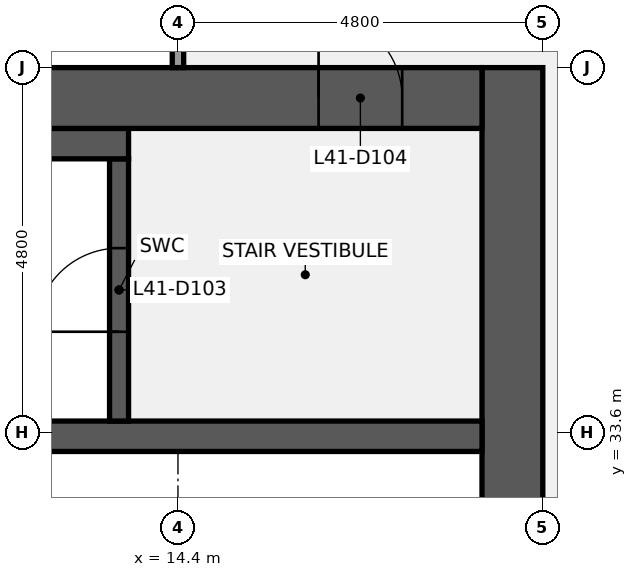
"""IFC4 building model, lengths in metres.
Left out: names, types, materials, properties, quantities, classifications, styles, units other than length and angle.
Written with IfcOpenShell. Run it as: python <this file> out.ifc"""

import sys

from ifc_helpers import new_model, si_unit, direction, frame, frame_2d, origin, place, context, subcontext, project, spatial, rectangle, extrude, element, fill, save


model = new_model("IFC4")
c1 = context("Model", 3, precision=1e-05, world=origin(), true_north=direction((0.0, 1.0)))
c2 = subcontext(c1, "Body", "Model", "MODEL_VIEW")
j1 = project(units=[si_unit("LENGTHUNIT", "METRE"), si_unit("PLANEANGLEUNIT", "RADIAN")], contexts=[c1])
p1 = place(None, origin())
s1 = spatial("IfcSite", under=j1, at=p1, CompositionType="ELEMENT")
p2 = place(p1, origin())
s2 = spatial("IfcBuilding", under=s1, at=p2, CompositionType="ELEMENT")
p3 = place(p2, frame((0.0, 0.0, 193.2)))
s3 = spatial("IfcBuildingStorey", under=s2, at=p3, CompositionType="ELEMENT", Elevation=193.2)
p4 = place(p3, frame((18.8, 38.4, 0.0), z_axis=(0.0, 0.0, 1.0), x_axis=(0.0, -1.0, 0.0)))
e1 = element("IfcWall", 1, at=p4, inside=s3, PredefinedType="SHEAR", context=c2, shape_type="SweptSolid", body=[
    extrude(rectangle(XDim=28.8, YDim=0.8, at=frame_2d((14.4, 0.0))), origin(), (0.0, 0.0, 1.0), 3.84),
])
p5 = place(p4, frame((18.3, 0.0, 0.0)))
e2 = element("IfcOpeningElement", 2, at=p5, cuts=e1, PredefinedType="OPENING", context=c2, shape_type="SweptSolid", body=[
    extrude(rectangle(XDim=1.8, YDim=2.1, at=frame_2d((0.9, 1.05))), frame((0.0, 0.41, 0.0), z_axis=(0.0, -1.0, 0.0), x_axis=(1.0, 0.0, 0.0)), (0.0, 0.0, 1.0), 0.82),
])
p6 = place(p4, frame((8.7, 0.0, 0.0)))
e3 = element("IfcOpeningElement", 3, at=p6, cuts=e1, PredefinedType="OPENING", context=c2, shape_type="SweptSolid", body=[
    extrude(rectangle(XDim=1.8, YDim=2.1, at=frame_2d((0.9, 1.05))), frame((0.0, 0.41, 0.0), z_axis=(0.0, -1.0, 0.0), x_axis=(1.0, 0.0, 0.0)), (0.0, 0.0, 1.0), 0.82),
])
p7 = place(p3, frame((0.8, 33.55, 0.0), z_axis=(0.0, 0.0, 1.0), x_axis=(1.0, 0.0, 0.0)))
e4 = element("IfcWall", 4, at=p7, inside=s3, PredefinedType="SHEAR", context=c2, shape_type="SweptSolid", body=[
    extrude(rectangle(XDim=17.6, YDim=0.4, at=frame_2d((8.8, 0.0))), origin(), (0.0, 0.0, 1.0), 3.84),
])
p8 = place(p3, frame((13.625, 33.75, 0.0), z_axis=(0.0, 0.0, 1.0), x_axis=(0.0, 1.0, 0.0)))
e5 = element("IfcWall", 5, at=p8, inside=s3, PredefinedType="SHEAR", context=c2, shape_type="SweptSolid", body=[
    extrude(rectangle(XDim=3.45, YDim=0.25, at=frame_2d((1.725, 0.0))), origin(), (0.0, 0.0, 1.0), 3.84),
])
p9 = place(p8, frame((1.175, 0.0, 0.0)))
e6 = element("IfcOpeningElement", 6, at=p9, cuts=e5, PredefinedType="OPENING", context=c2, shape_type="SweptSolid", body=[
    extrude(rectangle(XDim=1.1, YDim=2.1, at=frame_2d((0.55, 1.05))), frame((0.0, 0.135, 0.0), z_axis=(0.0, -1.0, 0.0), x_axis=(1.0, 0.0, 0.0)), (0.0, 0.0, 1.0), 0.27),
])
p10 = place(p3, frame((9.6, 37.4, 0.0), z_axis=(0.0, 0.0, 1.0), x_axis=(1.0, 0.0, 0.0)))
e7 = element("IfcWall", 7, at=p10, inside=s3, PredefinedType="SHEAR", context=c2, shape_type="SweptSolid", body=[
    extrude(rectangle(XDim=4.15, YDim=0.4, at=frame_2d((2.075, 0.0))), origin(), (0.0, 0.0, 1.0), 3.84),
])
p11 = place(p3, frame((9.6, 38.0, 0.0), z_axis=(0.0, 0.0, 1.0), x_axis=(1.0, 0.0, 0.0)))
e8 = element("IfcWall", 8, at=p11, inside=s3, PredefinedType="SHEAR", context=c2, shape_type="SweptSolid", body=[
    extrude(rectangle(XDim=8.8, YDim=0.8, at=frame_2d((4.4, 0.0))), origin(), (0.0, 0.0, 1.0), 3.84),
])
p12 = place(p11, frame((6.65, 0.0, 0.0)))
e9 = element("IfcOpeningElement", 9, at=p12, cuts=e8, PredefinedType="OPENING", context=c2, shape_type="SweptSolid", body=[
    extrude(rectangle(XDim=1.1, YDim=2.1, at=frame_2d((0.55, 1.05))), frame((0.0, 0.41, 0.0), z_axis=(0.0, -1.0, 0.0), x_axis=(1.0, 0.0, 0.0)), (0.0, 0.0, 1.0), 0.82),
])
p13 = place(p3, frame((14.4, 38.4, 0.0), z_axis=(0.0, 0.0, 1.0), x_axis=(0.0, 1.0, 0.0)))
e10 = element("IfcWall", 10, at=p13, inside=s3, PredefinedType="PARTITIONING", context=c2, shape_type="SweptSolid", body=[
    extrude(rectangle(XDim=2.325, YDim=0.15, at=frame_2d((1.163, 0.0))), origin(), (0.0, 0.0, 1.0), 2.849),
])
p14 = place(p13, frame((0.663, 0.0, 0.0)))
e11 = element("IfcOpeningElement", 11, at=p14, cuts=e10, PredefinedType="OPENING", context=c2, shape_type="SweptSolid", body=[
    extrude(rectangle(XDim=1.0, YDim=2.1, at=frame_2d((0.5, 1.05))), frame((0.0, 0.085, 0.0), z_axis=(0.0, -1.0, 0.0), x_axis=(1.0, 0.0, 0.0)), (0.0, 0.0, 1.0), 0.17),
])
p15 = place(p9, origin())
e12 = element("IfcDoor", 12, at=p15, inside=s3, OperationType="SINGLE_SWING_LEFT", PredefinedType="DOOR", context=c2, shape_type="SweptSolid", body=[
    extrude(rectangle(XDim=1.1, YDim=2.1, at=frame_2d((0.55, 1.05))), frame((0.0, 0.025, 0.0), z_axis=(0.0, -1.0, 0.0), x_axis=(1.0, 0.0, 0.0)), (0.0, 0.0, 1.0), 0.05),
])
fill(e6, e12)
p16 = place(p12, origin())
e13 = element("IfcDoor", 13, at=p16, inside=s3, OperationType="SINGLE_SWING_LEFT", PredefinedType="DOOR", context=c2, shape_type="SweptSolid", body=[
    extrude(rectangle(XDim=1.1, YDim=2.1, at=frame_2d((0.55, 1.05))), frame((0.0, 0.025, 0.0), z_axis=(0.0, -1.0, 0.0), x_axis=(1.0, 0.0, 0.0)), (0.0, 0.0, 1.0), 0.05),
])
fill(e9, e13)
save(model, sys.argv[1])
